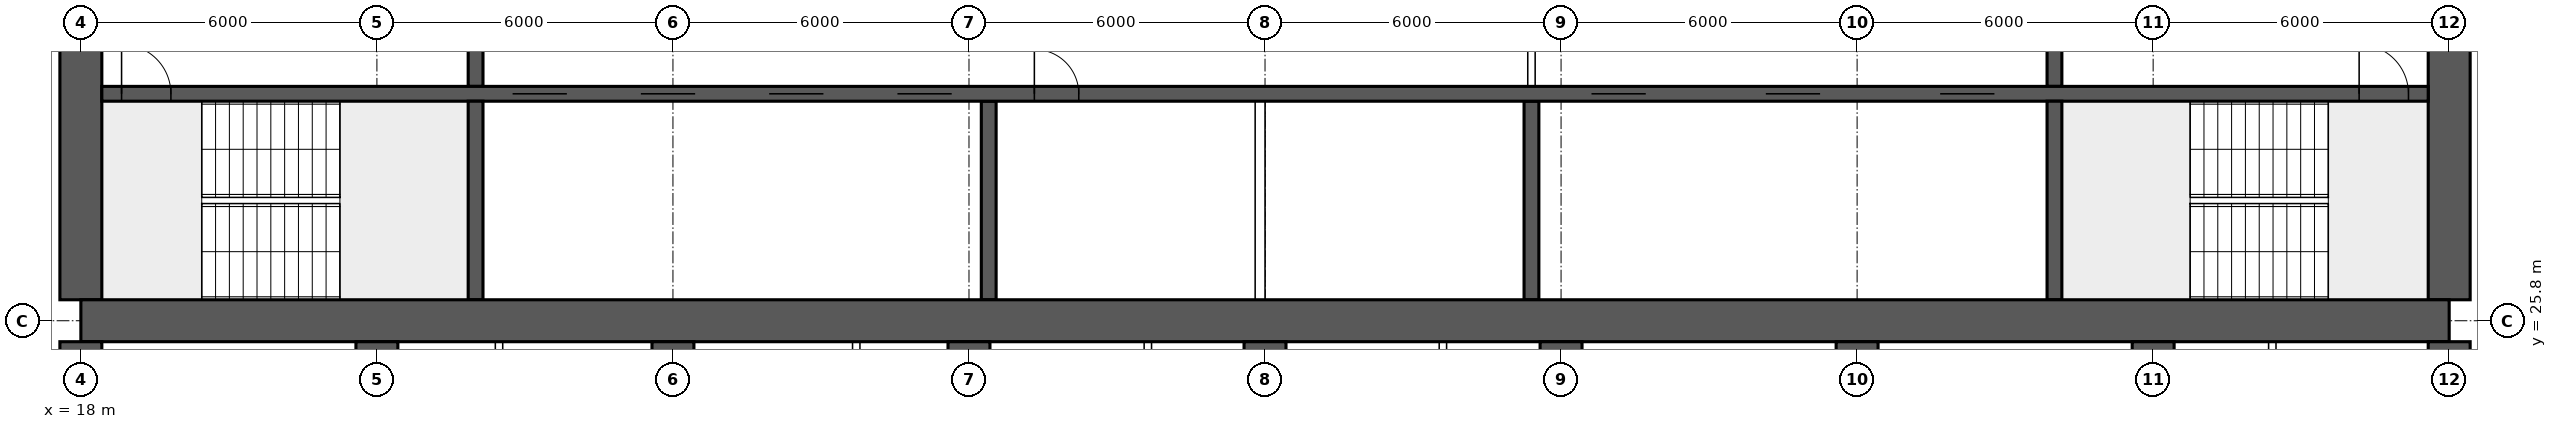
"""IFC4 building model, lengths in metres.
Left out: names, types, materials, properties, quantities, classifications, styles, units other than length and angle.
Written with IfcOpenShell. Run it as: python <this file> out.ifc"""

import sys

from ifc_helpers import new_model, si_unit, direction, frame, frame_2d, origin, place, context, subcontext, project, spatial, rectangle, extrude, element, fill, save


model = new_model("IFC4")
c1 = context("Model", 3, precision=1e-05, world=origin(), true_north=direction((0.0, 1.0)))
c2 = subcontext(c1, "Body", "Model", "MODEL_VIEW")
j1 = project(units=[si_unit("LENGTHUNIT", "METRE"), si_unit("PLANEANGLEUNIT", "RADIAN")], contexts=[c1])
p1 = place(None, origin())
s1 = spatial("IfcSite", under=j1, at=p1, CompositionType="ELEMENT")
p2 = place(p1, origin())
s2 = spatial("IfcBuilding", under=s1, at=p2, CompositionType="ELEMENT")
p3 = place(p2, frame((0.0, 0.0, 148.6)))
s3 = spatial("IfcBuildingStorey", under=s2, at=p3, CompositionType="ELEMENT", Elevation=148.6)
p4 = place(p3, frame((18.0, 25.8, 0.0), z_axis=(0.0, 0.0, 1.0), x_axis=(1.0, 0.0, 0.0)))
e1 = element("IfcWall", 1, at=p4, inside=s3, PredefinedType="SHEAR", context=c2, shape_type="SweptSolid", body=[
    extrude(rectangle(XDim=48.0, YDim=0.85, at=frame_2d((24.0, 0.0))), origin(), (0.0, 0.0, 1.0), 3.75),
])
p5 = place(p3, frame((18.0, 26.225, 0.0), z_axis=(0.0, 0.0, 1.0), x_axis=(0.0, 1.0, 0.0)))
e2 = element("IfcWall", 2, at=p5, inside=s3, PredefinedType="SHEAR", context=c2, shape_type="SweptSolid", body=[
    extrude(rectangle(XDim=11.55, YDim=0.85, at=frame_2d((5.775, 0.0))), origin(), (0.0, 0.0, 1.0), 3.75),
])
p6 = place(p5, frame((5.075, 0.0, 0.0)))
e3 = element("IfcOpeningElement", 3, at=p6, cuts=e2, PredefinedType="OPENING", context=c2, shape_type="SweptSolid", body=[
    extrude(rectangle(XDim=1.2, YDim=2.1, at=frame_2d((0.6, 1.05))), frame((0.0, 0.435, 0.0), z_axis=(0.0, -1.0, 0.0), x_axis=(1.0, 0.0, 0.0)), (0.0, 0.0, 1.0), 0.87),
])
p7 = place(p3, frame((66.0, 26.225, 0.0), z_axis=(0.0, 0.0, 1.0), x_axis=(0.0, 1.0, 0.0)))
e4 = element("IfcWall", 4, at=p7, inside=s3, PredefinedType="SHEAR", context=c2, shape_type="SweptSolid", body=[
    extrude(rectangle(XDim=11.55, YDim=0.85, at=frame_2d((5.775, 0.0))), origin(), (0.0, 0.0, 1.0), 3.75),
])
p8 = place(p7, frame((5.075, 0.0, 0.0)))
e5 = element("IfcOpeningElement", 5, at=p8, cuts=e4, PredefinedType="OPENING", context=c2, shape_type="SweptSolid", body=[
    extrude(rectangle(XDim=1.2, YDim=2.1, at=frame_2d((0.6, 1.05))), frame((0.0, 0.435, 0.0), z_axis=(0.0, -1.0, 0.0), x_axis=(1.0, 0.0, 0.0)), (0.0, 0.0, 1.0), 0.87),
])
p9 = place(p3, frame((18.425, 30.4, 0.0), z_axis=(0.0, 0.0, 1.0), x_axis=(1.0, 0.0, 0.0)))
e6 = element("IfcWall", 6, at=p9, inside=s3, PredefinedType="SHEAR", context=c2, shape_type="SweptSolid", body=[
    extrude(rectangle(XDim=47.15, YDim=0.3, at=frame_2d((23.575, 0.0))), origin(), (0.0, 0.0, 1.0), 3.75),
])
p10 = place(p9, frame((0.4, 0.0, 0.0)))
e7 = element("IfcOpeningElement", 7, at=p10, cuts=e6, PredefinedType="OPENING", context=c2, shape_type="SweptSolid", body=[
    extrude(rectangle(XDim=1.0, YDim=2.1, at=frame_2d((0.5, 1.05))), frame((0.0, 0.16, 0.0), z_axis=(0.0, -1.0, 0.0), x_axis=(1.0, 0.0, 0.0)), (0.0, 0.0, 1.0), 0.32),
])
p11 = place(p9, frame((45.75, 0.0, 0.0)))
e8 = element("IfcOpeningElement", 8, at=p11, cuts=e6, PredefinedType="OPENING", context=c2, shape_type="SweptSolid", body=[
    extrude(rectangle(XDim=1.0, YDim=2.1, at=frame_2d((0.5, 1.05))), frame((0.0, 0.16, 0.0), z_axis=(0.0, -1.0, 0.0), x_axis=(1.0, 0.0, 0.0)), (0.0, 0.0, 1.0), 0.32),
])
p12 = place(p9, frame((8.325, 0.0, 0.0)))
e9 = element("IfcOpeningElement", 9, at=p12, cuts=e6, PredefinedType="OPENING", context=c2, shape_type="SweptSolid", body=[
    extrude(rectangle(XDim=1.1, YDim=2.1, at=frame_2d((0.55, 1.05))), frame((0.0, 0.16, 0.0), z_axis=(0.0, -1.0, 0.0), x_axis=(1.0, 0.0, 0.0)), (0.0, 0.0, 1.0), 0.32),
])
p13 = place(p9, frame((10.925, 0.0, 0.0)))
e10 = element("IfcOpeningElement", 10, at=p13, cuts=e6, PredefinedType="OPENING", context=c2, shape_type="SweptSolid", body=[
    extrude(rectangle(XDim=1.1, YDim=2.1, at=frame_2d((0.55, 1.05))), frame((0.0, 0.16, 0.0), z_axis=(0.0, -1.0, 0.0), x_axis=(1.0, 0.0, 0.0)), (0.0, 0.0, 1.0), 0.32),
])
p14 = place(p9, frame((13.525, 0.0, 0.0)))
e11 = element("IfcOpeningElement", 11, at=p14, cuts=e6, PredefinedType="OPENING", context=c2, shape_type="SweptSolid", body=[
    extrude(rectangle(XDim=1.1, YDim=2.1, at=frame_2d((0.55, 1.05))), frame((0.0, 0.16, 0.0), z_axis=(0.0, -1.0, 0.0), x_axis=(1.0, 0.0, 0.0)), (0.0, 0.0, 1.0), 0.32),
])
p15 = place(p9, frame((16.125, 0.0, 0.0)))
e12 = element("IfcOpeningElement", 12, at=p15, cuts=e6, PredefinedType="OPENING", context=c2, shape_type="SweptSolid", body=[
    extrude(rectangle(XDim=1.1, YDim=2.1, at=frame_2d((0.55, 1.05))), frame((0.0, 0.16, 0.0), z_axis=(0.0, -1.0, 0.0), x_axis=(1.0, 0.0, 0.0)), (0.0, 0.0, 1.0), 0.32),
])
p16 = place(p9, frame((18.9, 0.0, 0.0)))
e13 = element("IfcOpeningElement", 13, at=p16, cuts=e6, PredefinedType="OPENING", context=c2, shape_type="SweptSolid", body=[
    extrude(rectangle(XDim=0.9, YDim=2.1, at=frame_2d((0.45, 1.05))), frame((0.0, 0.16, 0.0), z_axis=(0.0, -1.0, 0.0), x_axis=(1.0, 0.0, 0.0)), (0.0, 0.0, 1.0), 0.32),
])
p17 = place(p9, frame((30.192, 0.0, 0.0)))
e14 = element("IfcOpeningElement", 14, at=p17, cuts=e6, PredefinedType="OPENING", context=c2, shape_type="SweptSolid", body=[
    extrude(rectangle(XDim=1.1, YDim=2.1, at=frame_2d((0.55, 1.05))), frame((0.0, 0.16, 0.0), z_axis=(0.0, -1.0, 0.0), x_axis=(1.0, 0.0, 0.0)), (0.0, 0.0, 1.0), 0.32),
])
p18 = place(p9, frame((33.725, 0.0, 0.0)))
e15 = element("IfcOpeningElement", 15, at=p18, cuts=e6, PredefinedType="OPENING", context=c2, shape_type="SweptSolid", body=[
    extrude(rectangle(XDim=1.1, YDim=2.1, at=frame_2d((0.55, 1.05))), frame((0.0, 0.16, 0.0), z_axis=(0.0, -1.0, 0.0), x_axis=(1.0, 0.0, 0.0)), (0.0, 0.0, 1.0), 0.32),
])
p19 = place(p9, frame((37.258, 0.0, 0.0)))
e16 = element("IfcOpeningElement", 16, at=p19, cuts=e6, PredefinedType="OPENING", context=c2, shape_type="SweptSolid", body=[
    extrude(rectangle(XDim=1.1, YDim=2.1, at=frame_2d((0.55, 1.05))), frame((0.0, 0.16, 0.0), z_axis=(0.0, -1.0, 0.0), x_axis=(1.0, 0.0, 0.0)), (0.0, 0.0, 1.0), 0.32),
])
for number, where, z_axis, x_axis in (
    (17, (26.0, 26.225, 0.0), (0.0, 0.0, 1.0), (0.0, 1.0, 0.0)),
    (18, (58.0, 26.225, 0.0), (0.0, 0.0, 1.0), (0.0, 1.0, 0.0)),
):
    element("IfcWall", number, at=place(p3, frame(where, z_axis=z_axis, x_axis=x_axis)), inside=s3, PredefinedType="SHEAR", context=c2, shape_type="SweptSolid", body=[
        extrude(rectangle(XDim=4.025, YDim=0.3, at=frame_2d((2.012, 0.0))), origin(), (0.0, 0.0, 1.0), 3.75),
    ])
p20 = place(p3, frame((26.0, 30.55, 0.0), z_axis=(0.0, 0.0, 1.0), x_axis=(0.0, 1.0, 0.0)))
e19 = element("IfcWall", 19, at=p20, inside=s3, PredefinedType="SHEAR", context=c2, shape_type="SweptSolid", body=[
    extrude(rectangle(XDim=3.9, YDim=0.3, at=frame_2d((1.95, 0.0))), origin(), (0.0, 0.0, 1.0), 3.75),
])
p21 = place(p20, frame((1.4, 0.0, 0.0)))
e20 = element("IfcOpeningElement", 20, at=p21, cuts=e19, PredefinedType="OPENING", context=c2, shape_type="SweptSolid", body=[
    extrude(rectangle(XDim=1.2, YDim=2.1, at=frame_2d((0.6, 1.05))), frame((0.0, 0.16, 0.0), z_axis=(0.0, -1.0, 0.0), x_axis=(1.0, 0.0, 0.0)), (0.0, 0.0, 1.0), 0.32),
])
p22 = place(p3, frame((58.0, 30.55, 0.0), z_axis=(0.0, 0.0, 1.0), x_axis=(0.0, 1.0, 0.0)))
e21 = element("IfcWall", 21, at=p22, inside=s3, PredefinedType="SHEAR", context=c2, shape_type="SweptSolid", body=[
    extrude(rectangle(XDim=3.9, YDim=0.3, at=frame_2d((1.95, 0.0))), origin(), (0.0, 0.0, 1.0), 3.75),
])
p23 = place(p22, frame((1.4, 0.0, 0.0)))
e22 = element("IfcOpeningElement", 22, at=p23, cuts=e21, PredefinedType="OPENING", context=c2, shape_type="SweptSolid", body=[
    extrude(rectangle(XDim=1.2, YDim=2.1, at=frame_2d((0.6, 1.05))), frame((0.0, 0.16, 0.0), z_axis=(0.0, -1.0, 0.0), x_axis=(1.0, 0.0, 0.0)), (0.0, 0.0, 1.0), 0.32),
])
for number, where, z_axis, x_axis in (
    (23, (36.4, 26.225, 0.0), (0.0, 0.0, 1.0), (0.0, 1.0, 0.0)),
    (24, (47.4, 26.225, 0.0), (0.0, 0.0, 1.0), (0.0, 1.0, 0.0)),
):
    element("IfcWall", number, at=place(p3, frame(where, z_axis=z_axis, x_axis=x_axis)), inside=s3, PredefinedType="SHEAR", context=c2, shape_type="SweptSolid", body=[
        extrude(rectangle(XDim=4.025, YDim=0.3, at=frame_2d((2.012, 0.0))), origin(), (0.0, 0.0, 1.0), 3.75),
    ])
for number, where, z_axis, x_axis in (
    (25, (18.0, 17.2, 0.0), (0.0, 0.0, 1.0), (0.0, 1.0, 0.0)),
    (26, (24.0, 17.2, 0.0), (0.0, 0.0, 1.0), (0.0, 1.0, 0.0)),
    (27, (30.0, 17.2, 0.0), (0.0, 0.0, 1.0), (0.0, 1.0, 0.0)),
    (28, (36.0, 17.2, 0.0), (0.0, 0.0, 1.0), (0.0, 1.0, 0.0)),
    (29, (42.0, 17.2, 0.0), (0.0, 0.0, 1.0), (0.0, 1.0, 0.0)),
    (30, (48.0, 17.2, 0.0), (0.0, 0.0, 1.0), (0.0, 1.0, 0.0)),
    (31, (54.0, 17.2, 0.0), (0.0, 0.0, 1.0), (0.0, 1.0, 0.0)),
    (32, (60.0, 17.2, 0.0), (0.0, 0.0, 1.0), (0.0, 1.0, 0.0)),
    (33, (66.0, 17.2, 0.0), (0.0, 0.0, 1.0), (0.0, 1.0, 0.0)),
):
    element("IfcWall", number, at=place(p3, frame(where, z_axis=z_axis, x_axis=x_axis)), inside=s3, PredefinedType="SHEAR", context=c2, shape_type="SweptSolid", body=[
        extrude(rectangle(XDim=8.175, YDim=0.85, at=frame_2d((4.087, 0.0))), origin(), (0.0, 0.0, 1.0), 3.75),
    ])
p24 = place(p3, frame((47.4, 30.55, 0.0), z_axis=(0.0, 0.0, 1.0), x_axis=(0.0, 1.0, 0.0)))
e34 = element("IfcWall", 34, at=p24, inside=s3, PredefinedType="SOLIDWALL", context=c2, shape_type="SweptSolid", body=[
    extrude(rectangle(XDim=3.9, YDim=0.15, at=frame_2d((1.95, 0.0))), origin(), (0.0, 0.0, 1.0), 3.5),
])
p25 = place(p24, frame((1.15, 0.0, 0.0)))
e35 = element("IfcOpeningElement", 35, at=p25, cuts=e34, PredefinedType="OPENING", context=c2, shape_type="SweptSolid", body=[
    extrude(rectangle(XDim=1.6, YDim=2.1, at=frame_2d((0.8, 1.05))), frame((0.0, 0.085, 0.0), z_axis=(0.0, -1.0, 0.0), x_axis=(1.0, 0.0, 0.0)), (0.0, 0.0, 1.0), 0.17),
])
p26 = place(p3, frame((41.9, 26.225, 0.0), z_axis=(0.0, 0.0, 1.0), x_axis=(0.0, 1.0, 0.0)))
e36 = element("IfcWall", 36, at=p26, inside=s3, PredefinedType="SOLIDWALL", context=c2, shape_type="SweptSolid", body=[
    extrude(rectangle(XDim=4.025, YDim=0.2, at=frame_2d((2.012, 0.0))), origin(), (0.0, 0.0, 1.0), 3.5),
])
for number, where, z_axis, x_axis in (
    (37, (26.475, 17.3, 0.0), (0.0, 0.0, 1.0), (0.0, 1.0, 0.0)),
    (38, (33.715, 17.3, 0.0), (0.0, 0.0, 1.0), (0.0, 1.0, 0.0)),
    (39, (39.625, 17.3, 0.0), (0.0, 0.0, 1.0), (0.0, 1.0, 0.0)),
    (40, (45.605, 17.3, 0.0), (0.0, 0.0, 1.0), (0.0, 1.0, 0.0)),
    (41, (62.415, 17.3, 0.0), (0.0, 0.0, 1.0), (0.0, 1.0, 0.0)),
):
    element("IfcWall", number, at=place(p3, frame(where, z_axis=z_axis, x_axis=x_axis)), inside=s3, PredefinedType="PARTITIONING", context=c2, shape_type="SweptSolid", body=[
        extrude(rectangle(XDim=8.075, YDim=0.15, at=frame_2d((4.038, 0.0))), origin(), (0.0, 0.0, 1.0), 3.5),
    ])
p27 = place(p10, origin())
e42 = element("IfcDoor", 42, at=p27, inside=s3, OperationType="SINGLE_SWING_LEFT", PredefinedType="DOOR", context=c2, shape_type="SweptSolid", body=[
    extrude(rectangle(XDim=1.0, YDim=2.1, at=frame_2d((0.5, 1.05))), frame((0.0, 0.025, 0.0), z_axis=(0.0, -1.0, 0.0), x_axis=(1.0, 0.0, 0.0)), (0.0, 0.0, 1.0), 0.05),
])
fill(e7, e42)
p28 = place(p11, origin())
e43 = element("IfcDoor", 43, at=p28, inside=s3, OperationType="SINGLE_SWING_LEFT", PredefinedType="DOOR", context=c2, shape_type="SweptSolid", body=[
    extrude(rectangle(XDim=1.0, YDim=2.1, at=frame_2d((0.5, 1.05))), frame((0.0, 0.025, 0.0), z_axis=(0.0, -1.0, 0.0), x_axis=(1.0, 0.0, 0.0)), (0.0, 0.0, 1.0), 0.05),
])
fill(e8, e43)
p29 = place(p12, origin())
e44 = element("IfcDoor", 44, at=p29, inside=s3, OperationType="DOUBLE_DOOR_SLIDING", PredefinedType="DOOR", context=c2, shape_type="SweptSolid", body=[
    extrude(rectangle(XDim=1.1, YDim=2.1, at=frame_2d((0.55, 1.05))), frame((0.0, 0.025, 0.0), z_axis=(0.0, -1.0, 0.0), x_axis=(1.0, 0.0, 0.0)), (0.0, 0.0, 1.0), 0.05),
])
fill(e9, e44)
p30 = place(p13, origin())
e45 = element("IfcDoor", 45, at=p30, inside=s3, OperationType="DOUBLE_DOOR_SLIDING", PredefinedType="DOOR", context=c2, shape_type="SweptSolid", body=[
    extrude(rectangle(XDim=1.1, YDim=2.1, at=frame_2d((0.55, 1.05))), frame((0.0, 0.025, 0.0), z_axis=(0.0, -1.0, 0.0), x_axis=(1.0, 0.0, 0.0)), (0.0, 0.0, 1.0), 0.05),
])
fill(e10, e45)
p31 = place(p14, origin())
e46 = element("IfcDoor", 46, at=p31, inside=s3, OperationType="DOUBLE_DOOR_SLIDING", PredefinedType="DOOR", context=c2, shape_type="SweptSolid", body=[
    extrude(rectangle(XDim=1.1, YDim=2.1, at=frame_2d((0.55, 1.05))), frame((0.0, 0.025, 0.0), z_axis=(0.0, -1.0, 0.0), x_axis=(1.0, 0.0, 0.0)), (0.0, 0.0, 1.0), 0.05),
])
fill(e11, e46)
p32 = place(p15, origin())
e47 = element("IfcDoor", 47, at=p32, inside=s3, OperationType="DOUBLE_DOOR_SLIDING", PredefinedType="DOOR", context=c2, shape_type="SweptSolid", body=[
    extrude(rectangle(XDim=1.1, YDim=2.1, at=frame_2d((0.55, 1.05))), frame((0.0, 0.025, 0.0), z_axis=(0.0, -1.0, 0.0), x_axis=(1.0, 0.0, 0.0)), (0.0, 0.0, 1.0), 0.05),
])
fill(e12, e47)
p33 = place(p16, origin())
e48 = element("IfcDoor", 48, at=p33, inside=s3, OperationType="SINGLE_SWING_LEFT", PredefinedType="DOOR", context=c2, shape_type="SweptSolid", body=[
    extrude(rectangle(XDim=0.9, YDim=2.1, at=frame_2d((0.45, 1.05))), frame((0.0, 0.025, 0.0), z_axis=(0.0, -1.0, 0.0), x_axis=(1.0, 0.0, 0.0)), (0.0, 0.0, 1.0), 0.05),
])
fill(e13, e48)
p34 = place(p17, origin())
e49 = element("IfcDoor", 49, at=p34, inside=s3, OperationType="DOUBLE_DOOR_SLIDING", PredefinedType="DOOR", context=c2, shape_type="SweptSolid", body=[
    extrude(rectangle(XDim=1.1, YDim=2.1, at=frame_2d((0.55, 1.05))), frame((0.0, 0.025, 0.0), z_axis=(0.0, -1.0, 0.0), x_axis=(1.0, 0.0, 0.0)), (0.0, 0.0, 1.0), 0.05),
])
fill(e14, e49)
p35 = place(p18, origin())
e50 = element("IfcDoor", 50, at=p35, inside=s3, OperationType="DOUBLE_DOOR_SLIDING", PredefinedType="DOOR", context=c2, shape_type="SweptSolid", body=[
    extrude(rectangle(XDim=1.1, YDim=2.1, at=frame_2d((0.55, 1.05))), frame((0.0, 0.025, 0.0), z_axis=(0.0, -1.0, 0.0), x_axis=(1.0, 0.0, 0.0)), (0.0, 0.0, 1.0), 0.05),
])
fill(e15, e50)
p36 = place(p19, origin())
e51 = element("IfcDoor", 51, at=p36, inside=s3, OperationType="DOUBLE_DOOR_SLIDING", PredefinedType="DOOR", context=c2, shape_type="SweptSolid", body=[
    extrude(rectangle(XDim=1.1, YDim=2.1, at=frame_2d((0.55, 1.05))), frame((0.0, 0.025, 0.0), z_axis=(0.0, -1.0, 0.0), x_axis=(1.0, 0.0, 0.0)), (0.0, 0.0, 1.0), 0.05),
])
fill(e16, e51)
save(model, sys.argv[1])
